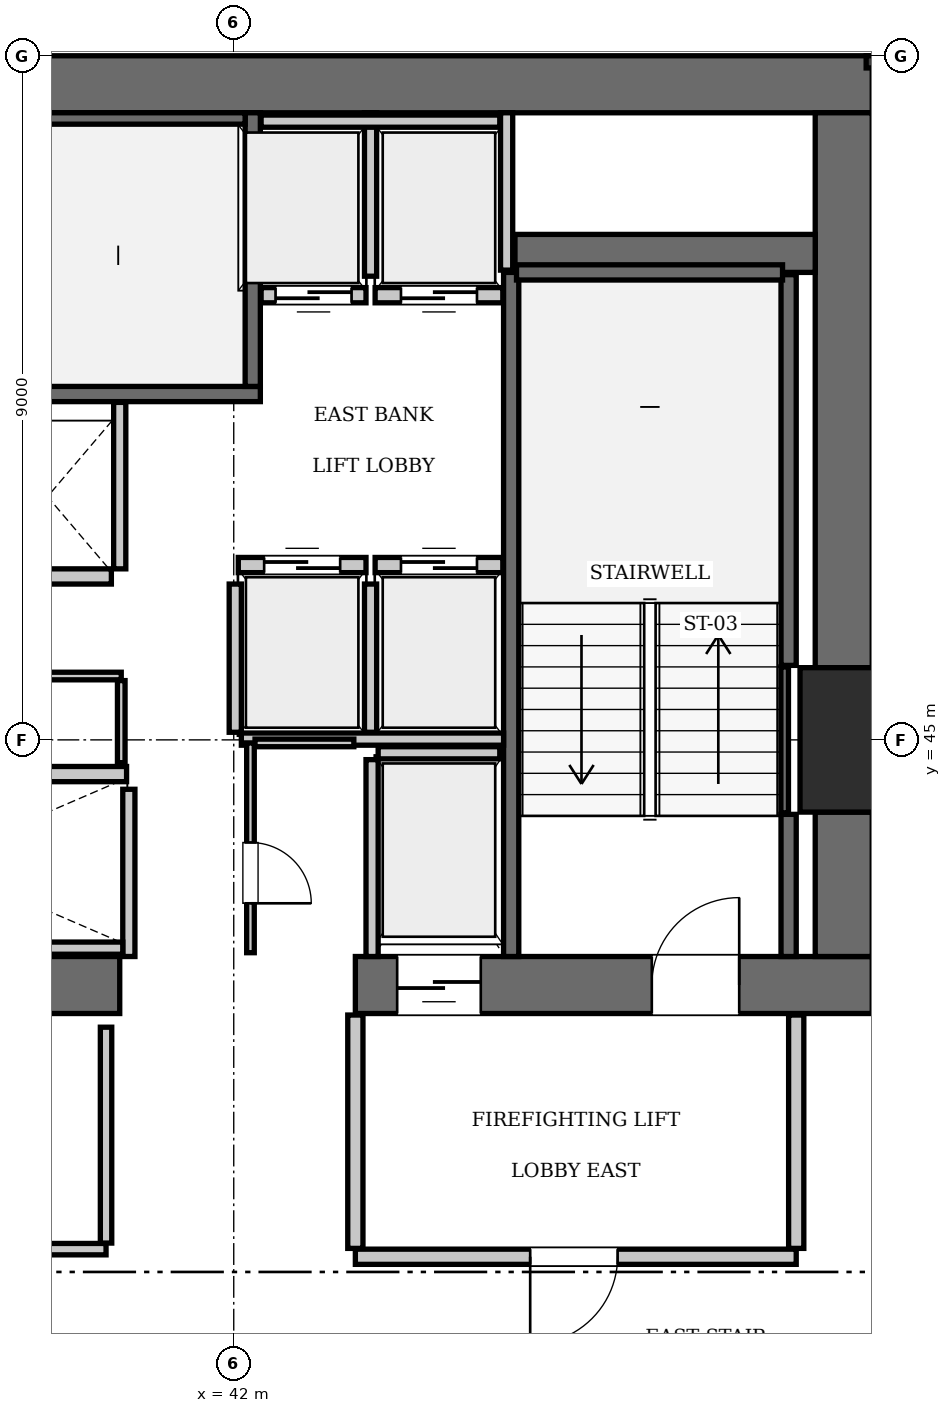
"""IFC4 building model, lengths in metres.
Left out: names, types, materials, properties, quantities, classifications, styles, units other than length and angle.
Written with IfcOpenShell. Run it as: python <this file> out.ifc"""

import sys

from ifc_helpers import new_model, si_unit, direction, frame, frame_2d, origin, origin_2d, place, context, subcontext, project, spatial, rectangle, extrude, element, fill, save


model = new_model("IFC4")
c1 = context("Model", 3, precision=1e-05, world=origin(), true_north=direction((0.0, 1.0)))
c2 = subcontext(c1, "Body", "Model", "MODEL_VIEW")
j1 = project(units=[si_unit("LENGTHUNIT", "METRE"), si_unit("PLANEANGLEUNIT", "RADIAN")], contexts=[c1])
p1 = place(None, origin())
s1 = spatial("IfcSite", under=j1, at=p1, CompositionType="ELEMENT")
p2 = place(p1, origin())
s2 = spatial("IfcBuilding", under=s1, at=p2, CompositionType="ELEMENT")
p3 = place(p2, frame((0.0, 0.0, 158.2)))
s3 = spatial("IfcBuildingStorey", under=s2, at=p3, CompositionType="ELEMENT", Elevation=158.2)
p4 = place(p3, frame((50.4, 45.0, 0.0), z_axis=(0.0, 0.0, 1.0), x_axis=(1.0, 0.0, 0.0)))
e1 = element("IfcColumn", 1, at=p4, inside=s3, PredefinedType="COLUMN", context=c2, shape_type="SweptSolid", body=[
    extrude(rectangle(XDim=1.9, YDim=1.9, at=origin_2d()), origin(), (0.0, 0.0, 1.0), 3.85),
])
p5 = place(p3, frame((25.2, 53.625, 0.0), z_axis=(0.0, 0.0, 1.0), x_axis=(1.0, 0.0, 0.0)))
e2 = element("IfcWall", 2, at=p5, inside=s3, PredefinedType="SHEAR", context=c2, shape_type="SweptSolid", body=[
    extrude(rectangle(XDim=25.2, YDim=0.75, at=frame_2d((12.6, 0.0))), origin(), (0.0, 0.0, 1.0), 3.85),
])
p6 = place(p3, frame((35.1, 41.775, 0.0), z_axis=(0.0, 0.0, 1.0), x_axis=(1.0, 0.0, 0.0)))
e3 = element("IfcWall", 3, at=p6, inside=s3, PredefinedType="SHEAR", context=c2, shape_type="SweptSolid", body=[
    extrude(rectangle(XDim=5.4, YDim=0.75, at=frame_2d((2.7, 0.0))), origin(), (0.0, 0.0, 1.0), 3.85),
])
p7 = place(p3, frame((43.6, 41.775, 0.0), z_axis=(0.0, 0.0, 1.0), x_axis=(1.0, 0.0, 0.0)))
e4 = element("IfcWall", 4, at=p7, inside=s3, PredefinedType="SHEAR", context=c2, shape_type="SweptSolid", body=[
    extrude(rectangle(XDim=6.8, YDim=0.75, at=frame_2d((3.4, 0.0))), origin(), (0.0, 0.0, 1.0), 3.85),
])
p8 = place(p7, frame((3.9, 0.0, 0.0)))
e5 = element("IfcOpeningElement", 5, at=p8, cuts=e4, PredefinedType="OPENING", context=c2, shape_type="SweptSolid", body=[
    extrude(rectangle(XDim=1.15, YDim=2.15, at=frame_2d((0.575, 1.075))), frame((0.0, 0.385, 0.0), z_axis=(0.0, -1.0, 0.0), x_axis=(1.0, 0.0, 0.0)), (0.0, 0.0, 1.0), 0.77),
])
p9 = place(p7, frame((0.55, 0.0, 0.0)))
e6 = element("IfcOpeningElement", 6, at=p9, cuts=e4, PredefinedType="OPENING", context=c2, shape_type="SweptSolid", body=[
    extrude(rectangle(XDim=1.1, YDim=2.2, at=frame_2d((0.55, 1.1))), frame((0.0, 0.385, 0.0), z_axis=(0.0, -1.0, 0.0), x_axis=(1.0, 0.0, 0.0)), (0.0, 0.0, 1.0), 0.77),
])
p10 = place(p3, frame((50.025, 42.15, 0.0), z_axis=(0.0, 0.0, 1.0), x_axis=(0.0, 1.0, 0.0)))
e7 = element("IfcWall", 7, at=p10, inside=s3, PredefinedType="SHEAR", context=c2, shape_type="SweptSolid", body=[
    extrude(rectangle(XDim=1.9, YDim=0.75, at=frame_2d((0.95, 0.0))), origin(), (0.0, 0.0, 1.0), 3.85),
])
p11 = place(p3, frame((50.025, 45.95, 0.0), z_axis=(0.0, 0.0, 1.0), x_axis=(0.0, 1.0, 0.0)))
e8 = element("IfcWall", 8, at=p11, inside=s3, PredefinedType="SHEAR", context=c2, shape_type="SweptSolid", body=[
    extrude(rectangle(XDim=7.3, YDim=0.75, at=frame_2d((3.65, 0.0))), origin(), (0.0, 0.0, 1.0), 3.85),
])
p12 = place(p3, frame((45.7, 51.4, 0.0), z_axis=(0.0, 0.0, 1.0), x_axis=(1.0, 0.0, 0.0)))
e9 = element("IfcWall", 9, at=p12, inside=s3, PredefinedType="SHEAR", context=c2, shape_type="SweptSolid", body=[
    extrude(rectangle(XDim=3.95, YDim=0.5, at=frame_2d((1.975, 0.0))), origin(), (0.0, 0.0, 1.0), 3.85),
])
p13 = place(p3, frame((33.25, 49.55, 0.0), z_axis=(0.0, 0.0, 1.0), x_axis=(1.0, 0.0, 0.0)))
e10 = element("IfcWall", 10, at=p13, inside=s3, PredefinedType="SOLIDWALL", context=c2, shape_type="SweptSolid", body=[
    extrude(rectangle(XDim=9.1, YDim=0.2, at=frame_2d((4.55, 0.0))), origin(), (0.0, 0.0, 1.0), 3.61),
])
p14 = place(p3, frame((42.25, 49.65, 0.0), z_axis=(0.0, 0.0, 1.0), x_axis=(0.0, 1.0, 0.0)))
e11 = element("IfcWall", 11, at=p14, inside=s3, PredefinedType="SOLIDWALL", context=c2, shape_type="SweptSolid", body=[
    extrude(rectangle(XDim=3.6, YDim=0.2, at=frame_2d((1.8, 0.0))), origin(), (0.0, 0.0, 1.0), 3.61),
])
p15 = place(p3, frame((33.45, 53.175, 0.0), z_axis=(0.0, 0.0, 1.0), x_axis=(1.0, 0.0, 0.0)))
e12 = element("IfcWall", 12, at=p15, inside=s3, PredefinedType="SOLIDWALL", context=c2, shape_type="SweptSolid", body=[
    extrude(rectangle(XDim=8.7, YDim=0.15, at=frame_2d((4.35, 0.0))), origin(), (0.0, 0.0, 1.0), 3.61),
])
p16 = place(p3, frame((45.65, 42.15, 0.0), z_axis=(0.0, 0.0, 1.0), x_axis=(0.0, 1.0, 0.0)))
e13 = element("IfcWall", 13, at=p16, inside=s3, PredefinedType="SOLIDWALL", context=c2, shape_type="SweptSolid", body=[
    extrude(rectangle(XDim=9.0, YDim=0.2, at=frame_2d((4.5, 0.0))), origin(), (0.0, 0.0, 1.0), 3.61),
])
p17 = place(p3, frame((49.3, 42.15, 0.0), z_axis=(0.0, 0.0, 1.0), x_axis=(0.0, 1.0, 0.0)))
e14 = element("IfcWall", 14, at=p17, inside=s3, PredefinedType="SOLIDWALL", context=c2, shape_type="SweptSolid", body=[
    extrude(rectangle(XDim=1.87, YDim=0.2, at=frame_2d((0.935, 0.0))), origin(), (0.0, 0.0, 1.0), 3.61),
])
p18 = place(p3, frame((49.3, 45.98, 0.0), z_axis=(0.0, 0.0, 1.0), x_axis=(0.0, 1.0, 0.0)))
e15 = element("IfcWall", 15, at=p18, inside=s3, PredefinedType="SOLIDWALL", context=c2, shape_type="SweptSolid", body=[
    extrude(rectangle(XDim=5.14, YDim=0.2, at=frame_2d((2.57, 0.0))), origin(), (0.0, 0.0, 1.0), 3.61),
])
p19 = place(p3, frame((45.72, 51.15, 0.0), z_axis=(0.0, 0.0, 1.0), x_axis=(1.0, 0.0, 0.0)))
e16 = element("IfcWall", 16, at=p19, inside=s3, PredefinedType="SOLIDWALL", context=c2, shape_type="SweptSolid", body=[
    extrude(rectangle(XDim=3.5, YDim=0.2, at=frame_2d((1.75, 0.0))), origin(), (0.0, 0.0, 1.0), 3.61),
])
p20 = place(p3, frame((49.248, 44.04, 0.0), z_axis=(0.0, 0.0, 1.0), x_axis=(0.0, 1.0, 0.0)))
e17 = element("IfcWall", 17, at=p20, inside=s3, PredefinedType="SOLIDWALL", context=c2, shape_type="SweptSolid", body=[
    extrude(rectangle(XDim=1.92, YDim=0.1, at=frame_2d((0.96, 0.0))), origin(), (0.0, 0.0, 1.0), 3.61),
])
p21 = place(p3, frame((42.06, 47.3, 0.0), z_axis=(0.0, 0.0, 1.0), x_axis=(1.0, 0.0, 0.0)))
e18 = element("IfcWall", 18, at=p21, inside=s3, PredefinedType="SOLIDWALL", context=c2, shape_type="SweptSolid", body=[
    extrude(rectangle(XDim=1.68, YDim=0.2, at=frame_2d((0.84, 0.0))), origin(), (0.0, 0.0, 1.0), 3.61),
])
p22 = place(p21, frame((0.34, 0.0, 0.0)))
e19 = element("IfcOpeningElement", 19, at=p22, cuts=e18, PredefinedType="OPENING", context=c2, shape_type="SweptSolid", body=[
    extrude(rectangle(XDim=1.0, YDim=2.15, at=frame_2d((0.5, 1.075))), frame((0.0, 0.11, 0.0), z_axis=(0.0, -1.0, 0.0), x_axis=(1.0, 0.0, 0.0)), (0.0, 0.0, 1.0), 0.22),
])
p23 = place(p3, frame((43.86, 47.3, 0.0), z_axis=(0.0, 0.0, 1.0), x_axis=(1.0, 0.0, 0.0)))
e20 = element("IfcWall", 20, at=p23, inside=s3, PredefinedType="SOLIDWALL", context=c2, shape_type="SweptSolid", body=[
    extrude(rectangle(XDim=1.68, YDim=0.2, at=frame_2d((0.84, 0.0))), origin(), (0.0, 0.0, 1.0), 3.61),
])
p24 = place(p23, frame((0.34, 0.0, 0.0)))
e21 = element("IfcOpeningElement", 21, at=p24, cuts=e20, PredefinedType="OPENING", context=c2, shape_type="SweptSolid", body=[
    extrude(rectangle(XDim=1.0, YDim=2.15, at=frame_2d((0.5, 1.075))), frame((0.0, 0.11, 0.0), z_axis=(0.0, -1.0, 0.0), x_axis=(1.0, 0.0, 0.0)), (0.0, 0.0, 1.0), 0.22),
])
p25 = place(p3, frame((42.36, 50.85, 0.0), z_axis=(0.0, 0.0, 1.0), x_axis=(1.0, 0.0, 0.0)))
e22 = element("IfcWall", 22, at=p25, inside=s3, PredefinedType="SOLIDWALL", context=c2, shape_type="SweptSolid", body=[
    extrude(rectangle(XDim=1.38, YDim=0.2, at=frame_2d((0.69, 0.0))), origin(), (0.0, 0.0, 1.0), 3.61),
])
p26 = place(p25, frame((0.19, 0.0, 0.0)))
e23 = element("IfcOpeningElement", 23, at=p26, cuts=e22, PredefinedType="OPENING", context=c2, shape_type="SweptSolid", body=[
    extrude(rectangle(XDim=1.0, YDim=2.15, at=frame_2d((0.5, 1.075))), frame((0.0, 0.11, 0.0), z_axis=(0.0, -1.0, 0.0), x_axis=(1.0, 0.0, 0.0)), (0.0, 0.0, 1.0), 0.22),
])
p27 = place(p3, frame((43.86, 50.85, 0.0), z_axis=(0.0, 0.0, 1.0), x_axis=(1.0, 0.0, 0.0)))
e24 = element("IfcWall", 24, at=p27, inside=s3, PredefinedType="SOLIDWALL", context=c2, shape_type="SweptSolid", body=[
    extrude(rectangle(XDim=1.68, YDim=0.2, at=frame_2d((0.84, 0.0))), origin(), (0.0, 0.0, 1.0), 3.61),
])
p28 = place(p27, frame((0.34, 0.0, 0.0)))
e25 = element("IfcOpeningElement", 25, at=p28, cuts=e24, PredefinedType="OPENING", context=c2, shape_type="SweptSolid", body=[
    extrude(rectangle(XDim=1.0, YDim=2.15, at=frame_2d((0.5, 1.075))), frame((0.0, 0.11, 0.0), z_axis=(0.0, -1.0, 0.0), x_axis=(1.0, 0.0, 0.0)), (0.0, 0.0, 1.0), 0.22),
])
p29 = place(p3, frame((38.91, 44.55, 0.0), z_axis=(0.0, 0.0, 1.0), x_axis=(1.0, 0.0, 0.0)))
e26 = element("IfcWall", 26, at=p29, inside=s3, PredefinedType="SOLIDWALL", context=c2, shape_type="SweptSolid", body=[
    extrude(rectangle(XDim=1.68, YDim=0.2, at=frame_2d((0.84, 0.0))), origin(), (0.0, 0.0, 1.0), 3.61),
])
p30 = place(p3, frame((38.71, 47.15, 0.0), z_axis=(0.0, 0.0, 1.0), x_axis=(1.0, 0.0, 0.0)))
e27 = element("IfcWall", 27, at=p30, inside=s3, PredefinedType="SOLIDWALL", context=c2, shape_type="SweptSolid", body=[
    extrude(rectangle(XDim=1.68, YDim=0.2, at=frame_2d((0.84, 0.0))), origin(), (0.0, 0.0, 1.0), 3.61),
])
p31 = place(p3, frame((43.9, 44.83, 0.0), z_axis=(0.0, 0.0, 1.0), x_axis=(1.0, 0.0, 0.0)))
e28 = element("IfcWall", 28, at=p31, inside=s3, PredefinedType="SOLIDWALL", context=c2, shape_type="SweptSolid", body=[
    extrude(rectangle(XDim=1.6, YDim=0.16, at=frame_2d((0.8, 0.0))), origin(), (0.0, 0.0, 1.0), 3.61),
])
p32 = place(p3, frame((43.82, 42.15, 0.0), z_axis=(0.0, 0.0, 1.0), x_axis=(0.0, 1.0, 0.0)))
e29 = element("IfcWall", 29, at=p32, inside=s3, PredefinedType="SOLIDWALL", context=c2, shape_type="SweptSolid", body=[
    extrude(rectangle(XDim=2.59, YDim=0.16, at=frame_2d((1.295, 0.0))), origin(), (0.0, 0.0, 1.0), 3.61),
])
for number, where, z_axis, x_axis in (
    (30, (42.02, 45.1, 0.0), (0.0, 0.0, 1.0), (0.0, 1.0, 0.0)),
    (31, (43.8, 45.1, 0.0), (0.0, 0.0, 1.0), (0.0, 1.0, 0.0)),
):
    element("IfcWall", number, at=place(p3, frame(where, z_axis=z_axis, x_axis=x_axis)), inside=s3, PredefinedType="SOLIDWALL", context=c2, shape_type="SweptSolid", body=[
        extrude(rectangle(XDim=1.95, YDim=0.16, at=frame_2d((0.975, 0.0))), origin(), (0.0, 0.0, 1.0), 3.61),
    ])
p33 = place(p3, frame((42.1, 45.01, 0.0), z_axis=(0.0, 0.0, 1.0), x_axis=(1.0, 0.0, 0.0)))
e32 = element("IfcWall", 32, at=p33, inside=s3, PredefinedType="SOLIDWALL", context=c2, shape_type="SweptSolid", body=[
    extrude(rectangle(XDim=3.45, YDim=0.16, at=frame_2d((1.725, 0.0))), origin(), (0.0, 0.0, 1.0), 3.61),
])
p34 = place(p3, frame((45.59, 51.18, 0.0), z_axis=(0.0, 0.0, 1.0), x_axis=(0.0, 1.0, 0.0)))
e33 = element("IfcWall", 33, at=p34, inside=s3, PredefinedType="SOLIDWALL", context=c2, shape_type="SweptSolid", body=[
    extrude(rectangle(XDim=2.07, YDim=0.16, at=frame_2d((1.035, 0.0))), origin(), (0.0, 0.0, 1.0), 3.61),
])
p35 = place(p3, frame((43.8, 51.1, 0.0), z_axis=(0.0, 0.0, 1.0), x_axis=(0.0, 1.0, 0.0)))
e34 = element("IfcWall", 34, at=p35, inside=s3, PredefinedType="SOLIDWALL", context=c2, shape_type="SweptSolid", body=[
    extrude(rectangle(XDim=2.15, YDim=0.16, at=frame_2d((1.075, 0.0))), origin(), (0.0, 0.0, 1.0), 3.61),
])
p36 = place(p3, frame((42.36, 53.14, 0.0), z_axis=(0.0, 0.0, 1.0), x_axis=(1.0, 0.0, 0.0)))
e35 = element("IfcWall", 35, at=p36, inside=s3, PredefinedType="SOLIDWALL", context=c2, shape_type="SweptSolid", body=[
    extrude(rectangle(XDim=3.14, YDim=0.16, at=frame_2d((1.57, 0.0))), origin(), (0.0, 0.0, 1.0), 3.61),
])
p37 = place(p3, frame((40.62, 42.15, 0.0), z_axis=(0.0, 0.0, 1.0), x_axis=(0.0, 1.0, 0.0)))
e36 = element("IfcWall", 36, at=p37, inside=s3, PredefinedType="SOLIDWALL", context=c2, shape_type="SweptSolid", body=[
    extrude(rectangle(XDim=2.2, YDim=0.16, at=frame_2d((1.1, 0.0))), origin(), (0.0, 0.0, 1.0), 3.61),
])
p38 = place(p3, frame((35.52, 42.26, 0.0), z_axis=(0.0, 0.0, 1.0), x_axis=(1.0, 0.0, 0.0)))
e37 = element("IfcWall", 37, at=p38, inside=s3, PredefinedType="SOLIDWALL", context=c2, shape_type="SweptSolid", body=[
    extrude(rectangle(XDim=5.02, YDim=0.16, at=frame_2d((2.51, 0.0))), origin(), (0.0, 0.0, 1.0), 3.61),
])
p39 = place(p3, frame((40.5, 47.25, 0.0), z_axis=(0.0, 0.0, 1.0), x_axis=(0.0, 1.0, 0.0)))
e38 = element("IfcWall", 38, at=p39, inside=s3, PredefinedType="SOLIDWALL", context=c2, shape_type="SweptSolid", body=[
    extrude(rectangle(XDim=2.19, YDim=0.16, at=frame_2d((1.095, 0.0))), origin(), (0.0, 0.0, 1.0), 3.61),
])
p40 = place(p3, frame((43.6, 38.2, 0.0), z_axis=(0.0, 0.0, 1.0), x_axis=(1.0, 0.0, 0.0)))
e39 = element("IfcWall", 39, at=p40, inside=s3, PredefinedType="PARTITIONING", context=c2, shape_type="SweptSolid", body=[
    extrude(rectangle(XDim=5.8, YDim=0.2, at=frame_2d((2.9, 0.0))), origin(), (0.0, 0.0, 1.0), 3.61),
])
p41 = place(p40, frame((2.3, 0.0, 0.0)))
e40 = element("IfcOpeningElement", 40, at=p41, cuts=e39, PredefinedType="OPENING", context=c2, shape_type="SweptSolid", body=[
    extrude(rectangle(XDim=1.15, YDim=2.15, at=frame_2d((0.575, 1.075))), frame((0.0, 0.11, 0.0), z_axis=(0.0, -1.0, 0.0), x_axis=(1.0, 0.0, 0.0)), (0.0, 0.0, 1.0), 0.22),
])
for number, where, z_axis, x_axis in (
    (41, (43.6, 38.31, 0.0), (0.0, 0.0, 1.0), (0.0, 1.0, 0.0)),
    (42, (49.4, 38.31, 0.0), (0.0, 0.0, 1.0), (0.0, 1.0, 0.0)),
):
    element("IfcWall", number, at=place(p3, frame(where, z_axis=z_axis, x_axis=x_axis)), inside=s3, PredefinedType="PARTITIONING", context=c2, shape_type="SweptSolid", body=[
        extrude(rectangle(XDim=3.07, YDim=0.2, at=frame_2d((1.535, 0.0))), origin(), (0.0, 0.0, 1.0), 3.61),
    ])
p42 = place(p3, frame((38.02, 45.84, 0.0), z_axis=(0.0, 0.0, 1.0), x_axis=(1.0, 0.0, 0.0)))
e43 = element("IfcWall", 43, at=p42, inside=s3, PredefinedType="PARTITIONING", context=c2, shape_type="SweptSolid", body=[
    extrude(rectangle(XDim=2.5, YDim=0.1, at=frame_2d((1.25, 0.0))), origin(), (0.0, 0.0, 1.0), 3.61),
])
p43 = place(p42, frame((0.75, 0.0, 0.0)))
e44 = element("IfcOpeningElement", 44, at=p43, cuts=e43, PredefinedType="OPENING", context=c2, shape_type="SweptSolid", body=[
    extrude(rectangle(XDim=0.8, YDim=2.05, at=frame_2d((0.4, 1.025))), frame((0.0, 0.06, 0.0), z_axis=(0.0, -1.0, 0.0), x_axis=(1.0, 0.0, 0.0)), (0.0, 0.0, 1.0), 0.12),
])
p44 = place(p3, frame((40.52, 44.7, 0.0), z_axis=(0.0, 0.0, 1.0), x_axis=(0.0, 1.0, 0.0)))
e45 = element("IfcWall", 45, at=p44, inside=s3, PredefinedType="PARTITIONING", context=c2, shape_type="SweptSolid", body=[
    extrude(rectangle(XDim=1.08, YDim=0.1, at=frame_2d((0.54, 0.0))), origin(), (0.0, 0.0, 1.0), 3.61),
])
p45 = place(p3, frame((42.22, 42.2, 0.0), z_axis=(0.0, 0.0, 1.0), x_axis=(0.0, 1.0, 0.0)))
e46 = element("IfcWall", 46, at=p45, inside=s3, PredefinedType="PARTITIONING", context=c2, shape_type="SweptSolid", body=[
    extrude(rectangle(XDim=2.76, YDim=0.1, at=frame_2d((1.38, 0.0))), origin(), (0.0, 0.0, 1.0), 3.61),
])
p46 = place(p45, frame((0.65, 0.0, 0.0)))
e47 = element("IfcOpeningElement", 47, at=p46, cuts=e46, PredefinedType="OPENING", context=c2, shape_type="SweptSolid", body=[
    extrude(rectangle(XDim=0.8, YDim=2.05, at=frame_2d((0.4, 1.025))), frame((0.0, 0.06, 0.0), z_axis=(0.0, -1.0, 0.0), x_axis=(1.0, 0.0, 0.0)), (0.0, 0.0, 1.0), 0.12),
])
p47 = place(p3, frame((42.28, 44.96, 0.0), z_axis=(0.0, 0.0, 1.0), x_axis=(1.0, 0.0, 0.0)))
e48 = element("IfcWall", 48, at=p47, inside=s3, PredefinedType="PARTITIONING", context=c2, shape_type="SweptSolid", body=[
    extrude(rectangle(XDim=1.3, YDim=0.1, at=frame_2d((0.65, 0.0))), origin(), (0.0, 0.0, 1.0), 3.61),
])
p48 = place(p3, frame((37.38, 38.3, 0.0), z_axis=(0.0, 0.0, 1.0), x_axis=(1.0, 0.0, 0.0)))
e49 = element("IfcWall", 49, at=p48, inside=s3, PredefinedType="PARTITIONING", context=c2, shape_type="SweptSolid", body=[
    extrude(rectangle(XDim=2.94, YDim=0.15, at=frame_2d((1.47, 0.0))), origin(), (0.0, 0.0, 1.0), 3.61),
])
p49 = place(p48, frame((1.0, 0.0, 0.0)))
e50 = element("IfcOpeningElement", 50, at=p49, cuts=e49, PredefinedType="OPENING", context=c2, shape_type="SweptSolid", body=[
    extrude(rectangle(XDim=0.8, YDim=2.05, at=frame_2d((0.4, 1.025))), frame((0.0, 0.085, 0.0), z_axis=(0.0, -1.0, 0.0), x_axis=(1.0, 0.0, 0.0)), (0.0, 0.0, 1.0), 0.17),
])
p50 = place(p3, frame((40.32, 38.38, 0.0), z_axis=(0.0, 0.0, 1.0), x_axis=(0.0, 1.0, 0.0)))
e51 = element("IfcWall", 51, at=p50, inside=s3, PredefinedType="PARTITIONING", context=c2, shape_type="SweptSolid", body=[
    extrude(rectangle(XDim=2.84, YDim=0.15, at=frame_2d((1.42, 0.0))), origin(), (0.0, 0.0, 1.0), 3.61),
])
p51 = place(p8, origin())
e52 = element("IfcDoor", 52, at=p51, inside=s3, OperationType="SINGLE_SWING_RIGHT", PredefinedType="DOOR", context=c2, shape_type="SweptSolid", body=[
    extrude(rectangle(XDim=1.15, YDim=2.15, at=frame_2d((0.575, 1.075))), frame((0.0, 0.025, 0.0), z_axis=(0.0, -1.0, 0.0), x_axis=(1.0, 0.0, 0.0)), (0.0, 0.0, 1.0), 0.05),
])
fill(e5, e52)
p52 = place(p22, origin())
e53 = element("IfcDoor", 53, at=p52, inside=s3, OperationType="SLIDING_TO_LEFT", PredefinedType="DOOR", context=c2, shape_type="SweptSolid", body=[
    extrude(rectangle(XDim=1.0, YDim=2.15, at=frame_2d((0.5, 1.075))), frame((0.0, 0.025, 0.0), z_axis=(0.0, -1.0, 0.0), x_axis=(1.0, 0.0, 0.0)), (0.0, 0.0, 1.0), 0.05),
])
fill(e19, e53)
p53 = place(p24, origin())
e54 = element("IfcDoor", 54, at=p53, inside=s3, OperationType="SLIDING_TO_LEFT", PredefinedType="DOOR", context=c2, shape_type="SweptSolid", body=[
    extrude(rectangle(XDim=1.0, YDim=2.15, at=frame_2d((0.5, 1.075))), frame((0.0, 0.025, 0.0), z_axis=(0.0, -1.0, 0.0), x_axis=(1.0, 0.0, 0.0)), (0.0, 0.0, 1.0), 0.05),
])
fill(e21, e54)
p54 = place(p26, frame((1.0, 0.0, 0.0), z_axis=(0.0, 0.0, 1.0), x_axis=(-1.0, 0.0, 0.0)))
e55 = element("IfcDoor", 55, at=p54, inside=s3, OperationType="SLIDING_TO_LEFT", PredefinedType="DOOR", context=c2, shape_type="SweptSolid", body=[
    extrude(rectangle(XDim=1.0, YDim=2.15, at=frame_2d((0.5, 1.075))), frame((0.0, 0.025, 0.0), z_axis=(0.0, -1.0, 0.0), x_axis=(1.0, 0.0, 0.0)), (0.0, 0.0, 1.0), 0.05),
])
fill(e23, e55)
p55 = place(p28, frame((1.0, 0.0, 0.0), z_axis=(0.0, 0.0, 1.0), x_axis=(-1.0, 0.0, 0.0)))
e56 = element("IfcDoor", 56, at=p55, inside=s3, OperationType="SLIDING_TO_LEFT", PredefinedType="DOOR", context=c2, shape_type="SweptSolid", body=[
    extrude(rectangle(XDim=1.0, YDim=2.15, at=frame_2d((0.5, 1.075))), frame((0.0, 0.025, 0.0), z_axis=(0.0, -1.0, 0.0), x_axis=(1.0, 0.0, 0.0)), (0.0, 0.0, 1.0), 0.05),
])
fill(e25, e56)
p56 = place(p9, frame((1.1, 0.0, 0.0), z_axis=(0.0, 0.0, 1.0), x_axis=(-1.0, 0.0, 0.0)))
e57 = element("IfcDoor", 57, at=p56, inside=s3, OperationType="SLIDING_TO_LEFT", PredefinedType="DOOR", context=c2, shape_type="SweptSolid", body=[
    extrude(rectangle(XDim=1.1, YDim=2.2, at=frame_2d((0.55, 1.1))), frame((0.0, 0.025, 0.0), z_axis=(0.0, -1.0, 0.0), x_axis=(1.0, 0.0, 0.0)), (0.0, 0.0, 1.0), 0.05),
])
fill(e6, e57)
p57 = place(p41, frame((1.15, 0.0, 0.0), z_axis=(0.0, 0.0, 1.0), x_axis=(-1.0, 0.0, 0.0)))
e58 = element("IfcDoor", 58, at=p57, inside=s3, OperationType="SINGLE_SWING_RIGHT", PredefinedType="DOOR", context=c2, shape_type="SweptSolid", body=[
    extrude(rectangle(XDim=1.15, YDim=2.15, at=frame_2d((0.575, 1.075))), frame((0.0, 0.025, 0.0), z_axis=(0.0, -1.0, 0.0), x_axis=(1.0, 0.0, 0.0)), (0.0, 0.0, 1.0), 0.05),
])
fill(e40, e58)
p58 = place(p46, frame((0.8, 0.0, 0.0), z_axis=(0.0, 0.0, 1.0), x_axis=(-1.0, 0.0, 0.0)))
e59 = element("IfcDoor", 59, at=p58, inside=s3, OperationType="SINGLE_SWING_RIGHT", PredefinedType="DOOR", context=c2, shape_type="SweptSolid", body=[
    extrude(rectangle(XDim=0.8, YDim=2.05, at=frame_2d((0.4, 1.025))), frame((0.0, 0.025, 0.0), z_axis=(0.0, -1.0, 0.0), x_axis=(1.0, 0.0, 0.0)), (0.0, 0.0, 1.0), 0.05),
])
fill(e47, e59)
save(model, sys.argv[1])
